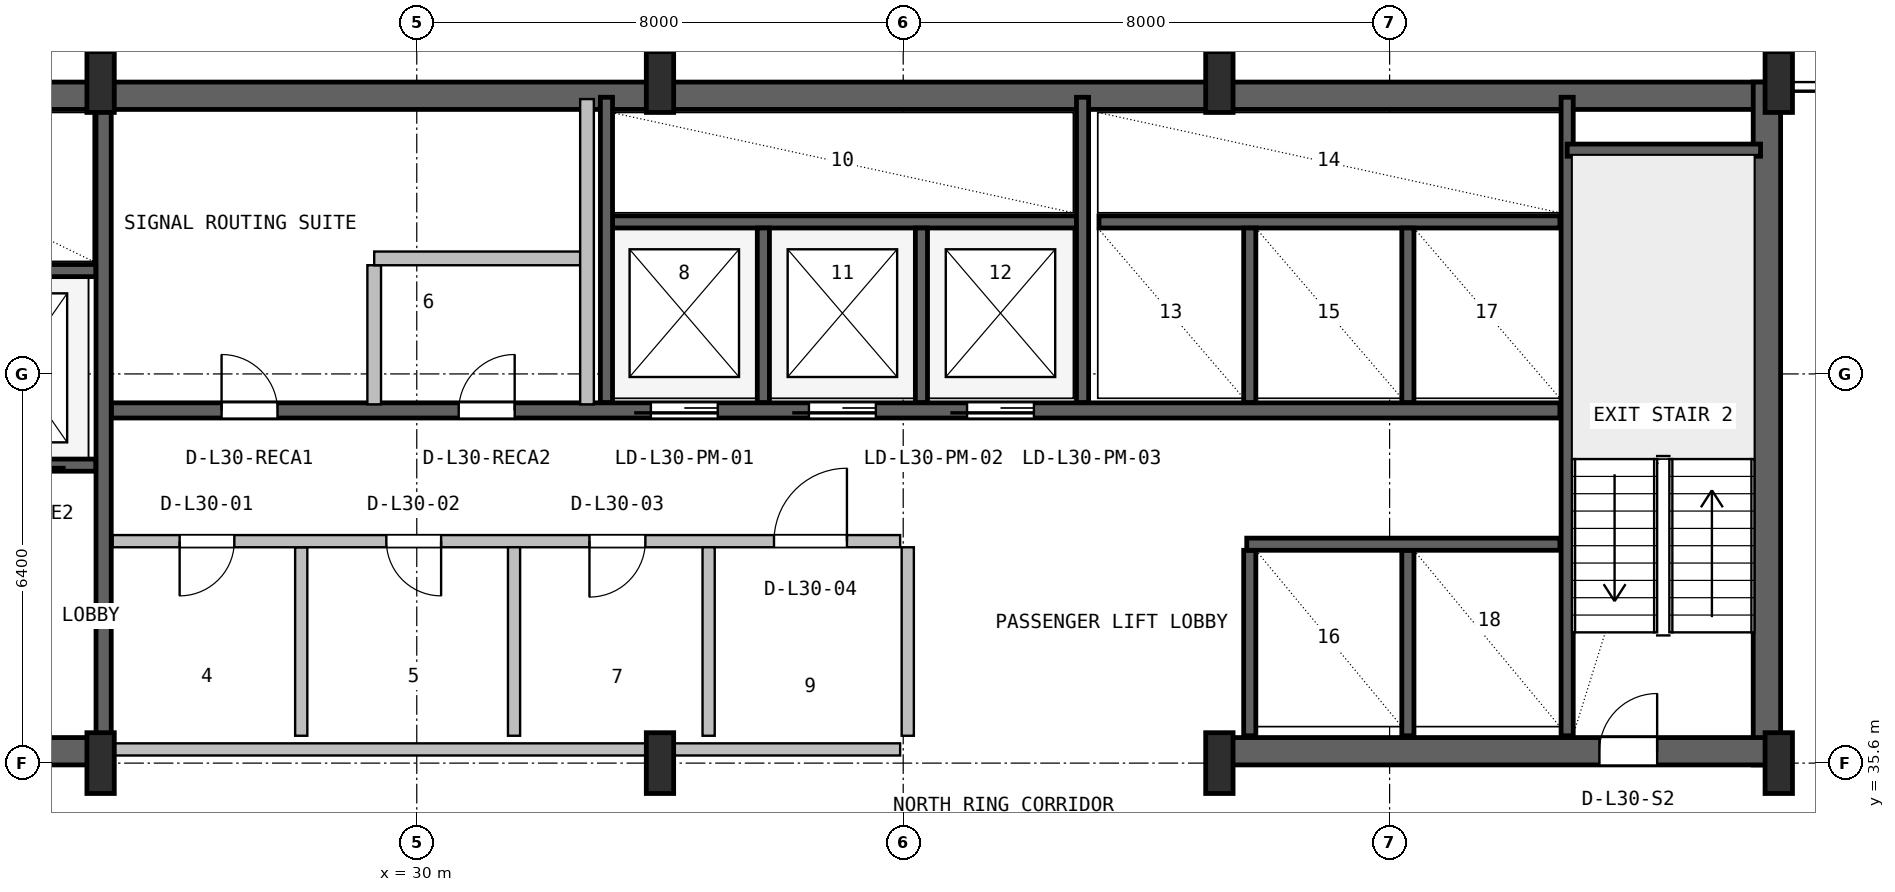
"""IFC4 building model, lengths in metres.
Left out: names, types, materials, properties, quantities, classifications, styles, units other than length and angle.
Written with IfcOpenShell. Run it as: python <this file> out.ifc"""

import sys

from ifc_helpers import new_model, si_unit, direction, frame, frame_2d, origin, origin_2d, place, context, subcontext, project, spatial, rectangle, i_section, extrude, source, transform, mapped, element, fill, save


model = new_model("IFC4")
c1 = context("Model", 3, precision=1e-05, world=origin(), true_north=direction((0.0, 1.0)))
c2 = subcontext(c1, "Body", "Model", "MODEL_VIEW")
j1 = project(units=[si_unit("LENGTHUNIT", "METRE"), si_unit("PLANEANGLEUNIT", "RADIAN")], contexts=[c1])
p1 = place(None, origin())
s1 = spatial("IfcSite", under=j1, at=p1, CompositionType="ELEMENT")
p2 = place(p1, origin())
s2 = spatial("IfcBuilding", under=s1, at=p2, CompositionType="ELEMENT")
p3 = place(p2, frame((0.0, 0.0, 125.8)))
s3 = spatial("IfcBuildingStorey", under=s2, at=p3, CompositionType="ELEMENT", Elevation=125.8)
p4 = place(p3, frame((15.6, 46.575, 0.0), z_axis=(0.0, 0.0, 1.0), x_axis=(1.0, 0.0, 0.0)))
e1 = element("IfcWall", 1, at=p4, inside=s3, PredefinedType="SHEAR", context=c2, shape_type="SweptSolid", body=[
    extrude(rectangle(XDim=36.8, YDim=0.45, at=frame_2d((18.4, 0.0))), origin(), (0.0, 0.0, 1.0), 3.55),
])
p5 = place(p3, frame((52.205, 35.57, 0.0), z_axis=(0.0, 0.0, 1.0), x_axis=(0.0, 1.0, 0.0)))
e2 = element("IfcWall", 2, at=p5, inside=s3, PredefinedType="SHEAR", context=c2, shape_type="SweptSolid", body=[
    extrude(rectangle(XDim=11.23, YDim=0.45, at=frame_2d((5.615, 0.0))), origin(), (0.0, 0.0, 1.0), 3.55),
])
p6 = place(p3, frame((15.57, 35.795, 0.0), z_axis=(0.0, 0.0, 1.0), x_axis=(1.0, 0.0, 0.0)))
e3 = element("IfcWall", 3, at=p6, inside=s3, PredefinedType="SHEAR", context=c2, shape_type="SweptSolid", body=[
    extrude(rectangle(XDim=9.23, YDim=0.45, at=frame_2d((4.615, 0.0))), origin(), (0.0, 0.0, 1.0), 3.55),
])
p7 = place(p6, frame((5.4, 0.0, 0.0)))
e4 = element("IfcOpeningElement", 4, at=p7, cuts=e3, PredefinedType="OPENING", context=c2, shape_type="SweptSolid", body=[
    extrude(rectangle(XDim=1.0, YDim=2.1, at=frame_2d((0.5, 1.05))), frame((0.0, 0.235, 0.0), z_axis=(0.0, -1.0, 0.0), x_axis=(1.0, 0.0, 0.0)), (0.0, 0.0, 1.0), 0.47),
])
p8 = place(p3, frame((43.2, 35.795, 0.0), z_axis=(0.0, 0.0, 1.0), x_axis=(1.0, 0.0, 0.0)))
e5 = element("IfcWall", 5, at=p8, inside=s3, PredefinedType="SHEAR", context=c2, shape_type="SweptSolid", body=[
    extrude(rectangle(XDim=9.23, YDim=0.45, at=frame_2d((4.615, 0.0))), origin(), (0.0, 0.0, 1.0), 3.55),
])
p9 = place(p8, frame((6.25, 0.0, 0.0)))
e6 = element("IfcOpeningElement", 6, at=p9, cuts=e5, PredefinedType="OPENING", context=c2, shape_type="SweptSolid", body=[
    extrude(rectangle(XDim=0.95, YDim=2.1, at=frame_2d((0.475, 1.05))), frame((0.0, 0.235, 0.0), z_axis=(0.0, -1.0, 0.0), x_axis=(1.0, 0.0, 0.0)), (0.0, 0.0, 1.0), 0.47),
])
m1 = source(origin(), c2, "Body", "SweptSolid", [
    extrude(i_section(OverallWidth=0.45, OverallDepth=1.0, WebThickness=0.016, FlangeThickness=0.03, FilletRadius=0.016, at=origin_2d()), origin(), (0.0, 0.0, 1.0), 3.8),
])
for number, where, z_axis, x_axis in (
    (7, (24.8, 35.6, 0.0), (0.0, 0.0, 1.0), (1.0, 0.0, 0.0)),
    (8, (24.8, 46.8, 0.0), (0.0, 0.0, 1.0), (1.0, 0.0, 0.0)),
    (9, (34.0, 35.6, 0.0), (0.0, 0.0, 1.0), (1.0, 0.0, 0.0)),
    (10, (34.0, 46.8, 0.0), (0.0, 0.0, 1.0), (1.0, 0.0, 0.0)),
    (11, (43.2, 35.6, 0.0), (0.0, 0.0, 1.0), (1.0, 0.0, 0.0)),
    (12, (43.2, 46.8, 0.0), (0.0, 0.0, 1.0), (1.0, 0.0, 0.0)),
    (13, (52.4, 35.6, 0.0), (0.0, 0.0, 1.0), (1.0, 0.0, 0.0)),
    (14, (52.4, 46.8, 0.0), (0.0, 0.0, 1.0), (1.0, 0.0, 0.0)),
):
    element("IfcColumn", number, at=place(p3, frame(where, z_axis=z_axis, x_axis=x_axis)), inside=s3, PredefinedType="COLUMN", context=c2, shape_type="MappedRepresentation", body=[
        mapped(m1, transform((0.0, 0.0, 0.0), x_axis=(1.0, 0.0, 0.0), y_axis=(0.0, 1.0, 0.0), z_axis=(0.0, 0.0, 1.0), scale=1.0)),
    ])
p10 = place(p3, frame((24.85, 36.05, 0.0), z_axis=(0.0, 0.0, 1.0), x_axis=(0.0, 1.0, 0.0)))
e15 = element("IfcWall", 15, at=p10, inside=s3, PredefinedType="SHEAR", context=c2, shape_type="SweptSolid", body=[
    extrude(rectangle(XDim=10.45, YDim=0.25, at=frame_2d((5.225, 0.0))), origin(), (0.0, 0.0, 1.0), 3.55),
])
p11 = place(p3, frame((19.2, 40.5, 0.0), z_axis=(0.0, 0.0, 1.0), x_axis=(1.0, 0.0, 0.0)))
e16 = element("IfcWall", 16, at=p11, inside=s3, PredefinedType="SHEAR", context=c2, shape_type="SweptSolid", body=[
    extrude(rectangle(XDim=5.52, YDim=0.2, at=frame_2d((2.76, 0.0))), origin(), (0.0, 0.0, 1.0), 3.55),
])
p12 = place(p11, frame((1.05, 0.0, 0.0)))
e17 = element("IfcOpeningElement", 17, at=p12, cuts=e16, PredefinedType="OPENING", context=c2, shape_type="SweptSolid", body=[
    extrude(rectangle(XDim=1.1, YDim=2.18, at=frame_2d((0.55, 1.09))), frame((0.0, 0.11, 0.0), z_axis=(0.0, -1.0, 0.0), x_axis=(1.0, 0.0, 0.0)), (0.0, 0.0, 1.0), 0.22),
])
p13 = place(p11, frame((3.65, 0.0, 0.0)))
e18 = element("IfcOpeningElement", 18, at=p13, cuts=e16, PredefinedType="OPENING", context=c2, shape_type="SweptSolid", body=[
    extrude(rectangle(XDim=1.1, YDim=2.18, at=frame_2d((0.55, 1.09))), frame((0.0, 0.11, 0.0), z_axis=(0.0, -1.0, 0.0), x_axis=(1.0, 0.0, 0.0)), (0.0, 0.0, 1.0), 0.22),
])
p14 = place(p3, frame((19.2, 43.7, 0.0), z_axis=(0.0, 0.0, 1.0), x_axis=(1.0, 0.0, 0.0)))
e19 = element("IfcWall", 19, at=p14, inside=s3, PredefinedType="SHEAR", context=c2, shape_type="SweptSolid", body=[
    extrude(rectangle(XDim=5.52, YDim=0.2, at=frame_2d((2.76, 0.0))), origin(), (0.0, 0.0, 1.0), 3.55),
])
p15 = place(p3, frame((48.92, 36.05, 0.0), z_axis=(0.0, 0.0, 1.0), x_axis=(0.0, 1.0, 0.0)))
e20 = element("IfcWall", 20, at=p15, inside=s3, PredefinedType="SHEAR", context=c2, shape_type="SweptSolid", body=[
    extrude(rectangle(XDim=10.5, YDim=0.2, at=frame_2d((5.25, 0.0))), origin(), (0.0, 0.0, 1.0), 3.55),
])
p16 = place(p3, frame((48.92, 45.68, 0.0), z_axis=(0.0, 0.0, 1.0), x_axis=(1.0, 0.0, 0.0)))
e21 = element("IfcWall", 21, at=p16, inside=s3, PredefinedType="SHEAR", context=c2, shape_type="SweptSolid", body=[
    extrude(rectangle(XDim=3.18, YDim=0.2, at=frame_2d((1.59, 0.0))), origin(), (0.0, 0.0, 1.0), 3.55),
])
p17 = place(p3, frame((24.98, 41.4, 0.0), z_axis=(0.0, 0.0, 1.0), x_axis=(1.0, 0.0, 0.0)))
e22 = element("IfcWall", 22, at=p17, inside=s3, PredefinedType="SHEAR", context=c2, shape_type="SweptSolid", body=[
    extrude(rectangle(XDim=23.82, YDim=0.25, at=frame_2d((11.91, 0.0))), origin(), (0.0, 0.0, 1.0), 3.55),
])
p18 = place(p17, frame((8.87, 0.0, 0.0)))
e23 = element("IfcOpeningElement", 23, at=p18, cuts=e22, PredefinedType="OPENING", context=c2, shape_type="SweptSolid", body=[
    extrude(rectangle(XDim=1.1, YDim=2.18, at=frame_2d((0.55, 1.09))), frame((0.0, 0.135, 0.0), z_axis=(0.0, -1.0, 0.0), x_axis=(1.0, 0.0, 0.0)), (0.0, 0.0, 1.0), 0.27),
])
p19 = place(p17, frame((11.47, 0.0, 0.0)))
e24 = element("IfcOpeningElement", 24, at=p19, cuts=e22, PredefinedType="OPENING", context=c2, shape_type="SweptSolid", body=[
    extrude(rectangle(XDim=1.1, YDim=2.18, at=frame_2d((0.55, 1.09))), frame((0.0, 0.135, 0.0), z_axis=(0.0, -1.0, 0.0), x_axis=(1.0, 0.0, 0.0)), (0.0, 0.0, 1.0), 0.27),
])
p20 = place(p17, frame((14.07, 0.0, 0.0)))
e25 = element("IfcOpeningElement", 25, at=p20, cuts=e22, PredefinedType="OPENING", context=c2, shape_type="SweptSolid", body=[
    extrude(rectangle(XDim=1.1, YDim=2.18, at=frame_2d((0.55, 1.09))), frame((0.0, 0.135, 0.0), z_axis=(0.0, -1.0, 0.0), x_axis=(1.0, 0.0, 0.0)), (0.0, 0.0, 1.0), 0.27),
])
p21 = place(p17, frame((1.81, 0.0, 0.0)))
e26 = element("IfcOpeningElement", 26, at=p21, cuts=e22, PredefinedType="OPENING", context=c2, shape_type="SweptSolid", body=[
    extrude(rectangle(XDim=0.92, YDim=2.08, at=frame_2d((0.46, 1.04))), frame((0.0, 0.135, 0.0), z_axis=(0.0, -1.0, 0.0), x_axis=(1.0, 0.0, 0.0)), (0.0, 0.0, 1.0), 0.27),
])
p22 = place(p17, frame((5.71, 0.0, 0.0)))
e27 = element("IfcOpeningElement", 27, at=p22, cuts=e22, PredefinedType="OPENING", context=c2, shape_type="SweptSolid", body=[
    extrude(rectangle(XDim=0.92, YDim=2.08, at=frame_2d((0.46, 1.04))), frame((0.0, 0.135, 0.0), z_axis=(0.0, -1.0, 0.0), x_axis=(1.0, 0.0, 0.0)), (0.0, 0.0, 1.0), 0.27),
])
p23 = place(p3, frame((33.22, 44.5, 0.0), z_axis=(0.0, 0.0, 1.0), x_axis=(1.0, 0.0, 0.0)))
e28 = element("IfcWall", 28, at=p23, inside=s3, PredefinedType="SHEAR", context=c2, shape_type="SweptSolid", body=[
    extrude(rectangle(XDim=7.63, YDim=0.2, at=frame_2d((3.815, 0.0))), origin(), (0.0, 0.0, 1.0), 3.55),
])
p24 = place(p3, frame((33.12, 41.53, 0.0), z_axis=(0.0, 0.0, 1.0), x_axis=(0.0, 1.0, 0.0)))
e29 = element("IfcWall", 29, at=p24, inside=s3, PredefinedType="SHEAR", context=c2, shape_type="SweptSolid", body=[
    extrude(rectangle(XDim=5.02, YDim=0.2, at=frame_2d((2.51, 0.0))), origin(), (0.0, 0.0, 1.0), 3.55),
])
for number, where, z_axis, x_axis in (
    (30, (35.7, 41.53, 0.0), (0.0, 0.0, 1.0), (0.0, 1.0, 0.0)),
    (31, (38.3, 41.53, 0.0), (0.0, 0.0, 1.0), (0.0, 1.0, 0.0)),
):
    element("IfcWall", number, at=place(p3, frame(where, z_axis=z_axis, x_axis=x_axis)), inside=s3, PredefinedType="SHEAR", context=c2, shape_type="SweptSolid", body=[
        extrude(rectangle(XDim=2.87, YDim=0.2, at=frame_2d((1.435, 0.0))), origin(), (0.0, 0.0, 1.0), 3.55),
    ])
p25 = place(p3, frame((40.95, 41.53, 0.0), z_axis=(0.0, 0.0, 1.0), x_axis=(0.0, 1.0, 0.0)))
e32 = element("IfcWall", 32, at=p25, inside=s3, PredefinedType="SHEAR", context=c2, shape_type="SweptSolid", body=[
    extrude(rectangle(XDim=5.02, YDim=0.2, at=frame_2d((2.51, 0.0))), origin(), (0.0, 0.0, 1.0), 3.55),
])
p26 = place(p3, frame((41.22, 44.5, 0.0), z_axis=(0.0, 0.0, 1.0), x_axis=(1.0, 0.0, 0.0)))
e33 = element("IfcWall", 33, at=p26, inside=s3, PredefinedType="SHEAR", context=c2, shape_type="SweptSolid", body=[
    extrude(rectangle(XDim=7.58, YDim=0.2, at=frame_2d((3.79, 0.0))), origin(), (0.0, 0.0, 1.0), 3.55),
])
for number, where, z_axis, x_axis in (
    (34, (43.7, 41.53, 0.0), (0.0, 0.0, 1.0), (0.0, 1.0, 0.0)),
    (35, (46.3, 41.53, 0.0), (0.0, 0.0, 1.0), (0.0, 1.0, 0.0)),
):
    element("IfcWall", number, at=place(p3, frame(where, z_axis=z_axis, x_axis=x_axis)), inside=s3, PredefinedType="SHEAR", context=c2, shape_type="SweptSolid", body=[
        extrude(rectangle(XDim=2.87, YDim=0.2, at=frame_2d((1.435, 0.0))), origin(), (0.0, 0.0, 1.0), 3.55),
    ])
for number, where, z_axis, x_axis in (
    (36, (43.7, 36.05, 0.0), (0.0, 0.0, 1.0), (0.0, 1.0, 0.0)),
    (37, (46.3, 36.05, 0.0), (0.0, 0.0, 1.0), (0.0, 1.0, 0.0)),
):
    element("IfcWall", number, at=place(p3, frame(where, z_axis=z_axis, x_axis=x_axis)), inside=s3, PredefinedType="SHEAR", context=c2, shape_type="SweptSolid", body=[
        extrude(rectangle(XDim=3.05, YDim=0.2, at=frame_2d((1.525, 0.0))), origin(), (0.0, 0.0, 1.0), 3.55),
    ])
p27 = place(p3, frame((43.65, 39.2, 0.0), z_axis=(0.0, 0.0, 1.0), x_axis=(1.0, 0.0, 0.0)))
e38 = element("IfcWall", 38, at=p27, inside=s3, PredefinedType="SHEAR", context=c2, shape_type="SweptSolid", body=[
    extrude(rectangle(XDim=5.15, YDim=0.2, at=frame_2d((2.575, 0.0))), origin(), (0.0, 0.0, 1.0), 3.55),
])
p28 = place(p3, frame((25.0, 35.825, 0.0), z_axis=(0.0, 0.0, 1.0), x_axis=(1.0, 0.0, 0.0)))
e39 = element("IfcWall", 39, at=p28, inside=s3, PredefinedType="SOLIDWALL", context=c2, shape_type="SweptSolid", body=[
    extrude(rectangle(XDim=12.95, YDim=0.2, at=frame_2d((6.475, 0.0))), origin(), (0.0, 0.0, 1.0), 2.325),
])
p29 = place(p3, frame((28.1, 36.05, 0.0), z_axis=(0.0, 0.0, 1.0), x_axis=(0.0, 1.0, 0.0)))
e40 = element("IfcWall", 40, at=p29, inside=s3, PredefinedType="PLUMBINGWALL", context=c2, shape_type="SweptSolid", body=[
    extrude(rectangle(XDim=3.1, YDim=0.2, at=frame_2d((1.55, 0.0))), origin(), (0.0, 0.0, 1.0), 3.53),
])
p30 = place(p3, frame((25.0, 39.25, 0.0), z_axis=(0.0, 0.0, 1.0), x_axis=(1.0, 0.0, 0.0)))
e41 = element("IfcWall", 41, at=p30, inside=s3, PredefinedType="SOLIDWALL", context=c2, shape_type="SweptSolid", body=[
    extrude(rectangle(XDim=12.95, YDim=0.2, at=frame_2d((6.475, 0.0))), origin(), (0.0, 0.0, 1.0), 3.53),
])
p31 = place(p30, frame((1.1, 0.0, 0.0)))
e42 = element("IfcOpeningElement", 42, at=p31, cuts=e41, PredefinedType="OPENING", context=c2, shape_type="SweptSolid", body=[
    extrude(rectangle(XDim=0.9, YDim=2.06, at=frame_2d((0.45, 1.03))), frame((0.0, 0.11, 0.0), z_axis=(0.0, -1.0, 0.0), x_axis=(1.0, 0.0, 0.0)), (0.0, 0.0, 1.0), 0.22),
])
p32 = place(p30, frame((4.5, 0.0, 0.0)))
e43 = element("IfcOpeningElement", 43, at=p32, cuts=e41, PredefinedType="OPENING", context=c2, shape_type="SweptSolid", body=[
    extrude(rectangle(XDim=0.9, YDim=2.06, at=frame_2d((0.45, 1.03))), frame((0.0, 0.11, 0.0), z_axis=(0.0, -1.0, 0.0), x_axis=(1.0, 0.0, 0.0)), (0.0, 0.0, 1.0), 0.22),
])
p33 = place(p30, frame((7.84, 0.0, 0.0)))
e44 = element("IfcOpeningElement", 44, at=p33, cuts=e41, PredefinedType="OPENING", context=c2, shape_type="SweptSolid", body=[
    extrude(rectangle(XDim=0.92, YDim=2.08, at=frame_2d((0.46, 1.04))), frame((0.0, 0.11, 0.0), z_axis=(0.0, -1.0, 0.0), x_axis=(1.0, 0.0, 0.0)), (0.0, 0.0, 1.0), 0.22),
])
p34 = place(p30, frame((10.875, 0.0, 0.0)))
e45 = element("IfcOpeningElement", 45, at=p34, cuts=e41, PredefinedType="OPENING", context=c2, shape_type="SweptSolid", body=[
    extrude(rectangle(XDim=1.2, YDim=2.1, at=frame_2d((0.6, 1.05))), frame((0.0, 0.11, 0.0), z_axis=(0.0, -1.0, 0.0), x_axis=(1.0, 0.0, 0.0)), (0.0, 0.0, 1.0), 0.22),
])
p35 = place(p3, frame((31.6, 36.05, 0.0), z_axis=(0.0, 0.0, 1.0), x_axis=(0.0, 1.0, 0.0)))
e46 = element("IfcWall", 46, at=p35, inside=s3, PredefinedType="PLUMBINGWALL", context=c2, shape_type="SweptSolid", body=[
    extrude(rectangle(XDim=3.1, YDim=0.2, at=frame_2d((1.55, 0.0))), origin(), (0.0, 0.0, 1.0), 3.53),
])
for number, where, z_axis, x_axis in (
    (47, (34.8, 36.05, 0.0), (0.0, 0.0, 1.0), (0.0, 1.0, 0.0)),
    (48, (38.075, 36.05, 0.0), (0.0, 0.0, 1.0), (0.0, 1.0, 0.0)),
):
    element("IfcWall", number, at=place(p3, frame(where, z_axis=z_axis, x_axis=x_axis)), inside=s3, PredefinedType="SOLIDWALL", context=c2, shape_type="SweptSolid", body=[
        extrude(rectangle(XDim=3.1, YDim=0.2, at=frame_2d((1.55, 0.0))), origin(), (0.0, 0.0, 1.0), 3.53),
    ])
p36 = place(p3, frame((29.3, 41.5, 0.0), z_axis=(0.0, 0.0, 1.0), x_axis=(0.0, 1.0, 0.0)))
e49 = element("IfcWall", 49, at=p36, inside=s3, PredefinedType="PARTITIONING", context=c2, shape_type="SweptSolid", body=[
    extrude(rectangle(XDim=2.288, YDim=0.225, at=frame_2d((1.144, 0.0))), origin(), (0.0, 0.0, 1.0), 3.53),
])
p37 = place(p3, frame((29.3, 43.9, 0.0), z_axis=(0.0, 0.0, 1.0), x_axis=(1.0, 0.0, 0.0)))
e50 = element("IfcWall", 50, at=p37, inside=s3, PredefinedType="PARTITIONING", context=c2, shape_type="SweptSolid", body=[
    extrude(rectangle(XDim=3.5, YDim=0.225, at=frame_2d((1.75, 0.0))), origin(), (0.0, 0.0, 1.0), 3.53),
])
p38 = place(p3, frame((32.8, 41.5, 0.0), z_axis=(0.0, 0.0, 1.0), x_axis=(0.0, 1.0, 0.0)))
e51 = element("IfcWall", 51, at=p38, inside=s3, PredefinedType="PARTITIONING", context=c2, shape_type="SweptSolid", body=[
    extrude(rectangle(XDim=5.02, YDim=0.225, at=frame_2d((2.51, 0.0))), origin(), (0.0, 0.0, 1.0), 3.53),
])
m2 = source(origin(), c2, "Body", "SweptSolid", [
    extrude(rectangle(XDim=0.95, YDim=2.1, at=frame_2d((0.475, 1.05))), frame((0.0, 0.025, 0.0), z_axis=(0.0, -1.0, 0.0), x_axis=(1.0, 0.0, 0.0)), (0.0, 0.0, 1.0), 0.05),
])
p39 = place(p9, origin())
e52 = element("IfcDoor", 52, at=p39, inside=s3, OperationType="SINGLE_SWING_RIGHT", PredefinedType="DOOR", context=c2, shape_type="MappedRepresentation", body=[
    mapped(m2, transform((0.0, 0.0, 0.0), x_axis=(1.0, 0.0, 0.0), y_axis=(0.0, 1.0, 0.0), z_axis=(0.0, 0.0, 1.0), scale=1.0)),
])
fill(e6, e52)
m3 = source(origin(), c2, "Body", "SweptSolid", [
    extrude(rectangle(XDim=1.1, YDim=2.18, at=frame_2d((0.55, 1.09))), frame((0.0, 0.025, 0.0), z_axis=(0.0, -1.0, 0.0), x_axis=(1.0, 0.0, 0.0)), (0.0, 0.0, 1.0), 0.05),
])
p40 = place(p18, frame((1.1, 0.0, 0.0), z_axis=(0.0, 0.0, 1.0), x_axis=(-1.0, 0.0, 0.0)))
e53 = element("IfcDoor", 53, at=p40, inside=s3, OperationType="SLIDING_TO_LEFT", PredefinedType="DOOR", context=c2, shape_type="MappedRepresentation", body=[
    mapped(m3, transform((0.0, 0.0, 0.0), x_axis=(1.0, 0.0, 0.0), y_axis=(0.0, 1.0, 0.0), z_axis=(0.0, 0.0, 1.0), scale=1.0)),
])
fill(e23, e53)
p41 = place(p19, frame((1.1, 0.0, 0.0), z_axis=(0.0, 0.0, 1.0), x_axis=(-1.0, 0.0, 0.0)))
e54 = element("IfcDoor", 54, at=p41, inside=s3, OperationType="SLIDING_TO_LEFT", PredefinedType="DOOR", context=c2, shape_type="MappedRepresentation", body=[
    mapped(m3, transform((0.0, 0.0, 0.0), x_axis=(1.0, 0.0, 0.0), y_axis=(0.0, 1.0, 0.0), z_axis=(0.0, 0.0, 1.0), scale=1.0)),
])
fill(e24, e54)
p42 = place(p20, frame((1.1, 0.0, 0.0), z_axis=(0.0, 0.0, 1.0), x_axis=(-1.0, 0.0, 0.0)))
e55 = element("IfcDoor", 55, at=p42, inside=s3, OperationType="SLIDING_TO_LEFT", PredefinedType="DOOR", context=c2, shape_type="MappedRepresentation", body=[
    mapped(m3, transform((0.0, 0.0, 0.0), x_axis=(1.0, 0.0, 0.0), y_axis=(0.0, 1.0, 0.0), z_axis=(0.0, 0.0, 1.0), scale=1.0)),
])
fill(e25, e55)
m4 = source(origin(), c2, "Body", "SweptSolid", [
    extrude(rectangle(XDim=0.92, YDim=2.08, at=frame_2d((0.46, 1.04))), frame((0.0, 0.025, 0.0), z_axis=(0.0, -1.0, 0.0), x_axis=(1.0, 0.0, 0.0)), (0.0, 0.0, 1.0), 0.05),
])
p43 = place(p21, origin())
e56 = element("IfcDoor", 56, at=p43, inside=s3, OperationType="SINGLE_SWING_LEFT", PredefinedType="DOOR", context=c2, shape_type="MappedRepresentation", body=[
    mapped(m4, transform((0.0, 0.0, 0.0), x_axis=(1.0, 0.0, 0.0), y_axis=(0.0, 1.0, 0.0), z_axis=(0.0, 0.0, 1.0), scale=1.0)),
])
fill(e26, e56)
p44 = place(p22, origin())
e57 = element("IfcDoor", 57, at=p44, inside=s3, OperationType="SINGLE_SWING_RIGHT", PredefinedType="DOOR", context=c2, shape_type="MappedRepresentation", body=[
    mapped(m4, transform((0.0, 0.0, 0.0), x_axis=(1.0, 0.0, 0.0), y_axis=(0.0, 1.0, 0.0), z_axis=(0.0, 0.0, 1.0), scale=1.0)),
])
fill(e27, e57)
m5 = source(origin(), c2, "Body", "SweptSolid", [
    extrude(rectangle(XDim=0.9, YDim=2.06, at=frame_2d((0.45, 1.03))), frame((0.0, 0.025, 0.0), z_axis=(0.0, -1.0, 0.0), x_axis=(1.0, 0.0, 0.0)), (0.0, 0.0, 1.0), 0.05),
])
p45 = place(p31, frame((0.9, 0.0, 0.0), z_axis=(0.0, 0.0, 1.0), x_axis=(-1.0, 0.0, 0.0)))
e58 = element("IfcDoor", 58, at=p45, inside=s3, OperationType="SINGLE_SWING_LEFT", PredefinedType="DOOR", context=c2, shape_type="MappedRepresentation", body=[
    mapped(m5, transform((0.0, 0.0, 0.0), x_axis=(1.0, 0.0, 0.0), y_axis=(0.0, 1.0, 0.0), z_axis=(0.0, 0.0, 1.0), scale=1.0)),
])
fill(e42, e58)
p46 = place(p32, frame((0.9, 0.0, 0.0), z_axis=(0.0, 0.0, 1.0), x_axis=(-1.0, 0.0, 0.0)))
e59 = element("IfcDoor", 59, at=p46, inside=s3, OperationType="SINGLE_SWING_RIGHT", PredefinedType="DOOR", context=c2, shape_type="MappedRepresentation", body=[
    mapped(m5, transform((0.0, 0.0, 0.0), x_axis=(1.0, 0.0, 0.0), y_axis=(0.0, 1.0, 0.0), z_axis=(0.0, 0.0, 1.0), scale=1.0)),
])
fill(e43, e59)
p47 = place(p33, frame((0.92, 0.0, 0.0), z_axis=(0.0, 0.0, 1.0), x_axis=(-1.0, 0.0, 0.0)))
e60 = element("IfcDoor", 60, at=p47, inside=s3, OperationType="SINGLE_SWING_LEFT", PredefinedType="DOOR", context=c2, shape_type="MappedRepresentation", body=[
    mapped(m4, transform((0.0, 0.0, 0.0), x_axis=(1.0, 0.0, 0.0), y_axis=(0.0, 1.0, 0.0), z_axis=(0.0, 0.0, 1.0), scale=1.0)),
])
fill(e44, e60)
m6 = source(origin(), c2, "Body", "SweptSolid", [
    extrude(rectangle(XDim=1.2, YDim=2.1, at=frame_2d((0.6, 1.05))), frame((0.0, 0.025, 0.0), z_axis=(0.0, -1.0, 0.0), x_axis=(1.0, 0.0, 0.0)), (0.0, 0.0, 1.0), 0.05),
])
p48 = place(p34, origin())
e61 = element("IfcDoor", 61, at=p48, inside=s3, OperationType="SINGLE_SWING_RIGHT", PredefinedType="DOOR", context=c2, shape_type="MappedRepresentation", body=[
    mapped(m6, transform((0.0, 0.0, 0.0), x_axis=(1.0, 0.0, 0.0), y_axis=(0.0, 1.0, 0.0), z_axis=(0.0, 0.0, 1.0), scale=1.0)),
])
fill(e45, e61)
save(model, sys.argv[1])
